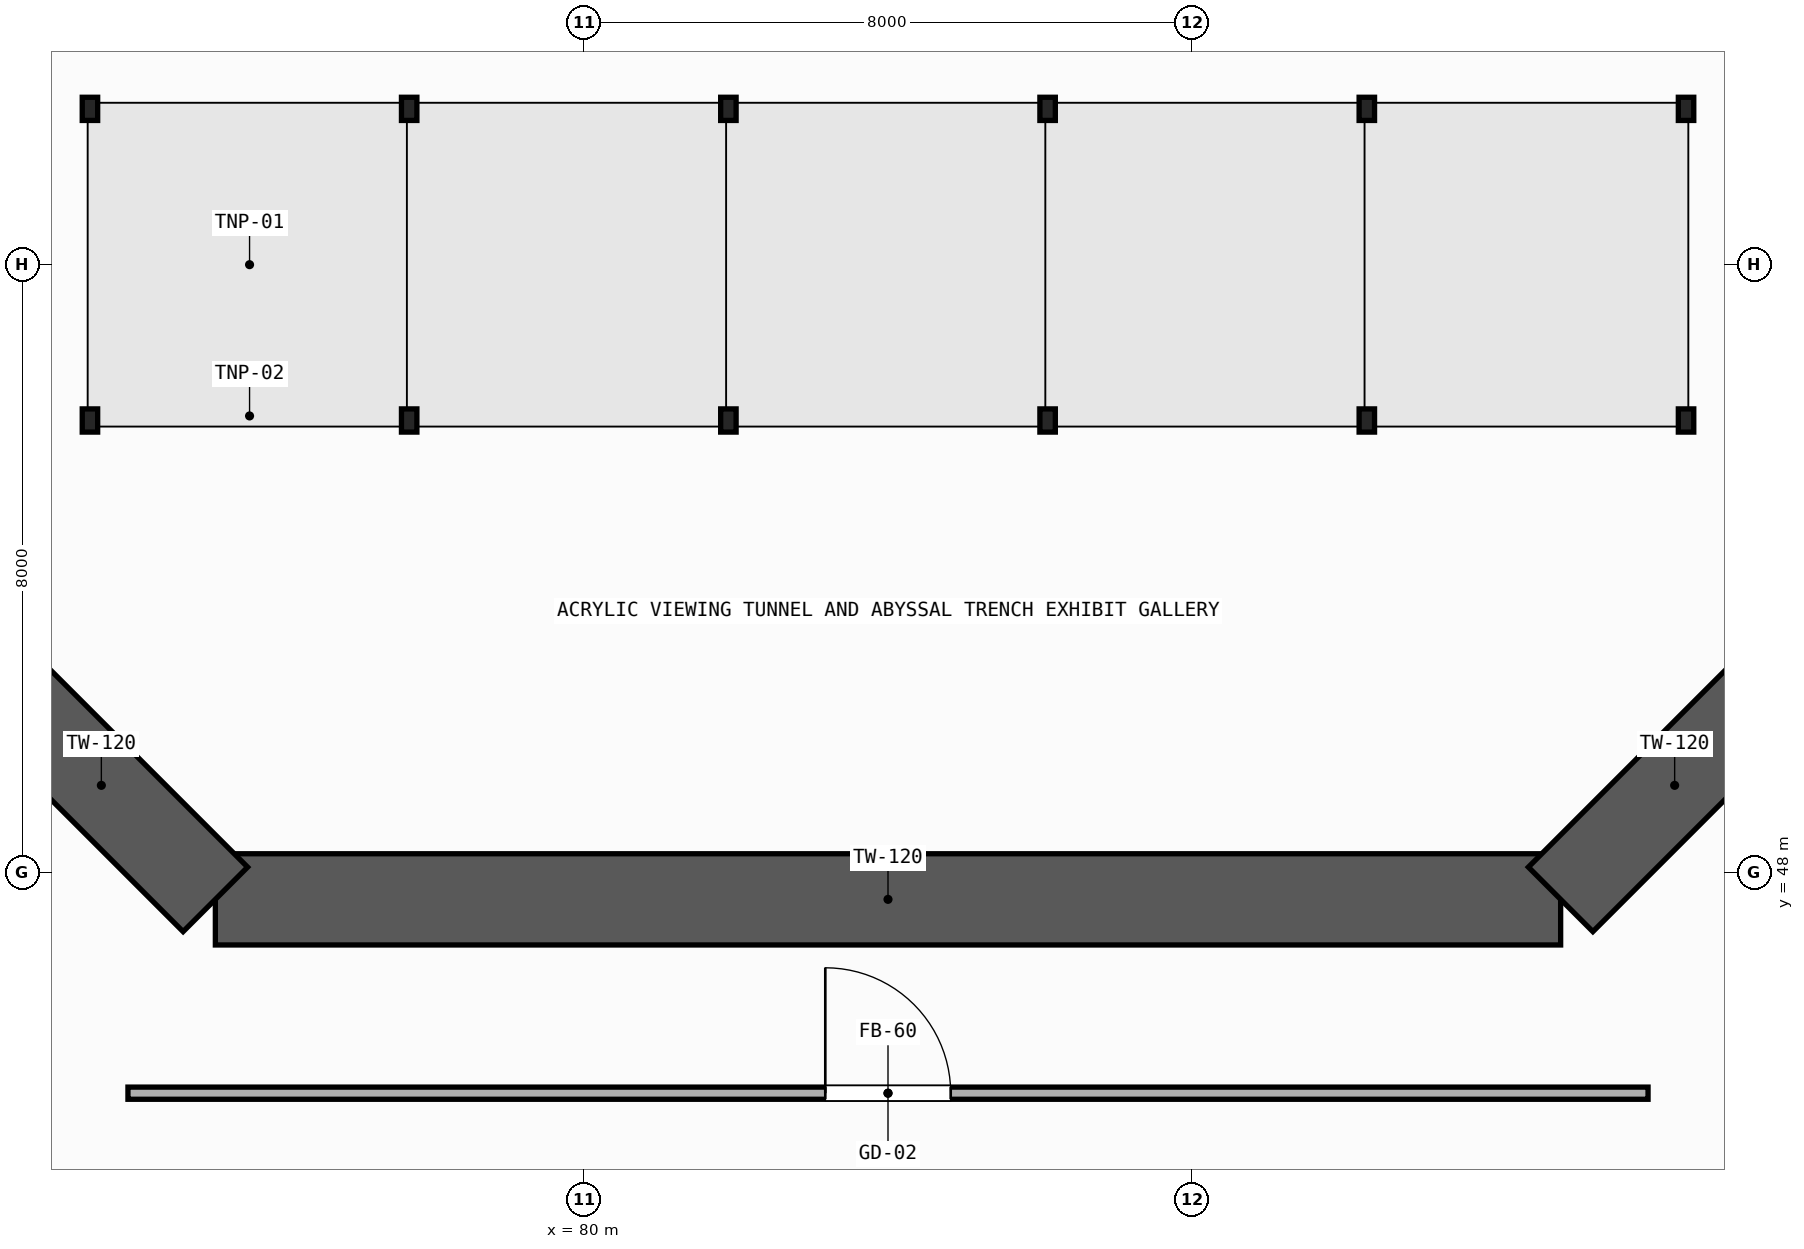
"""IFC4 building model, lengths in metres.
Left out: names, types, materials, properties, quantities, classifications, styles, units other than length and angle.
Written with IfcOpenShell. Run it as: python <this file> out.ifc"""

import sys

from ifc_helpers import new_model, si_unit, direction, frame, frame_2d, origin, origin_2d, place, context, subcontext, project, spatial, rectangle, hollow_rectangle, extrude, element, fill, save


model = new_model("IFC4")
c1 = context("Model", 3, precision=1e-05, world=origin(), true_north=direction((0.0, 1.0)))
c2 = subcontext(c1, "Body", "Model", "MODEL_VIEW")
j1 = project(units=[si_unit("LENGTHUNIT", "METRE"), si_unit("PLANEANGLEUNIT", "RADIAN")], contexts=[c1])
p1 = place(None, origin())
s1 = spatial("IfcSite", under=j1, at=p1, CompositionType="ELEMENT")
p2 = place(p1, origin())
s2 = spatial("IfcBuilding", under=s1, at=p2, CompositionType="ELEMENT")
p3 = place(p2, frame((0.0, 0.0, -5.4)))
s3 = spatial("IfcBuildingStorey", under=s2, at=p3, CompositionType="ELEMENT", Elevation=-5.4)
p4 = place(p3, frame((75.15, 47.65, 0.0), z_axis=(0.0, 0.0, 1.0), x_axis=(1.0, 0.0, 0.0)))
e1 = element("IfcWall", 1, at=p4, inside=s3, PredefinedType="SOLIDWALL", context=c2, shape_type="SweptSolid", body=[
    extrude(rectangle(XDim=17.7, YDim=1.2, at=frame_2d((8.85, 0.0))), origin(), (0.0, 0.0, 1.0), 5.4),
])
for number, where, z_axis, x_axis in (
    (2, (92.85, 47.65, 0.0), (0.0, 0.0, 1.0), (0.707, 0.707, 0.0)),
    (3, (72.15, 50.65, 0.0), (0.0, 0.0, 1.0), (0.707, -0.707, 0.0)),
):
    element("IfcWall", number, at=place(p3, frame(where, z_axis=z_axis, x_axis=x_axis)), inside=s3, PredefinedType="SOLIDWALL", context=c2, shape_type="SweptSolid", body=[
        extrude(rectangle(XDim=4.243, YDim=1.2, at=frame_2d((2.121, 0.0))), origin(), (0.0, 0.0, 1.0), 5.4),
    ])
for number, where, z_axis, x_axis in (
    (4, (73.5, 53.95, 0.0), (0.0, 0.0, 1.0), (1.0, 0.0, 0.0)),
    (5, (73.5, 58.05, 0.0), (0.0, 0.0, 1.0), (1.0, 0.0, 0.0)),
    (6, (77.7, 53.95, 0.0), (0.0, 0.0, 1.0), (1.0, 0.0, 0.0)),
    (7, (77.7, 58.05, 0.0), (0.0, 0.0, 1.0), (1.0, 0.0, 0.0)),
    (8, (81.9, 53.95, 0.0), (0.0, 0.0, 1.0), (1.0, 0.0, 0.0)),
    (9, (81.9, 58.05, 0.0), (0.0, 0.0, 1.0), (1.0, 0.0, 0.0)),
    (10, (86.1, 53.95, 0.0), (0.0, 0.0, 1.0), (1.0, 0.0, 0.0)),
    (11, (86.1, 58.05, 0.0), (0.0, 0.0, 1.0), (1.0, 0.0, 0.0)),
    (12, (90.3, 53.95, 0.0), (0.0, 0.0, 1.0), (1.0, 0.0, 0.0)),
    (13, (90.3, 58.05, 0.0), (0.0, 0.0, 1.0), (1.0, 0.0, 0.0)),
    (14, (94.5, 53.95, 0.0), (0.0, 0.0, 1.0), (1.0, 0.0, 0.0)),
    (15, (94.5, 58.05, 0.0), (0.0, 0.0, 1.0), (1.0, 0.0, 0.0)),
):
    element("IfcColumn", number, at=place(p3, frame(where, z_axis=z_axis, x_axis=x_axis)), inside=s3, PredefinedType="COLUMN", context=c2, shape_type="SweptSolid", body=[
        extrude(hollow_rectangle(XDim=0.203, YDim=0.305, WallThickness=0.009, InnerFilletRadius=0.009, OuterFilletRadius=0.018, at=origin_2d()), origin(), (0.0, 0.0, 1.0), 2.65),
    ])
p5 = place(p3, frame((74.0, 45.1, 0.0), z_axis=(0.0, 0.0, 1.0), x_axis=(1.0, 0.0, 0.0)))
e16 = element("IfcWall", 16, at=p5, inside=s3, PredefinedType="PARTITIONING", context=c2, shape_type="SweptSolid", body=[
    extrude(rectangle(XDim=20.0, YDim=0.16, at=frame_2d((10.0, 0.0))), origin(), (0.0, 0.0, 1.0), 4.29),
])
p6 = place(p5, frame((9.175, 0.0, 0.0)))
e17 = element("IfcOpeningElement", 17, at=p6, cuts=e16, PredefinedType="OPENING", context=c2, shape_type="SweptSolid", body=[
    extrude(rectangle(XDim=1.65, YDim=2.35, at=frame_2d((0.825, 1.175))), frame((0.0, 0.09, 0.0), z_axis=(0.0, -1.0, 0.0), x_axis=(1.0, 0.0, 0.0)), (0.0, 0.0, 1.0), 0.18),
])
p7 = place(p6, origin())
e18 = element("IfcDoor", 18, at=p7, inside=s3, OperationType="SINGLE_SWING_LEFT", PredefinedType="DOOR", context=c2, shape_type="SweptSolid", body=[
    extrude(rectangle(XDim=1.65, YDim=2.35, at=frame_2d((0.825, 1.175))), frame((0.0, 0.025, 0.0), z_axis=(0.0, -1.0, 0.0), x_axis=(1.0, 0.0, 0.0)), (0.0, 0.0, 1.0), 0.05),
])
fill(e17, e18)
save(model, sys.argv[1])
